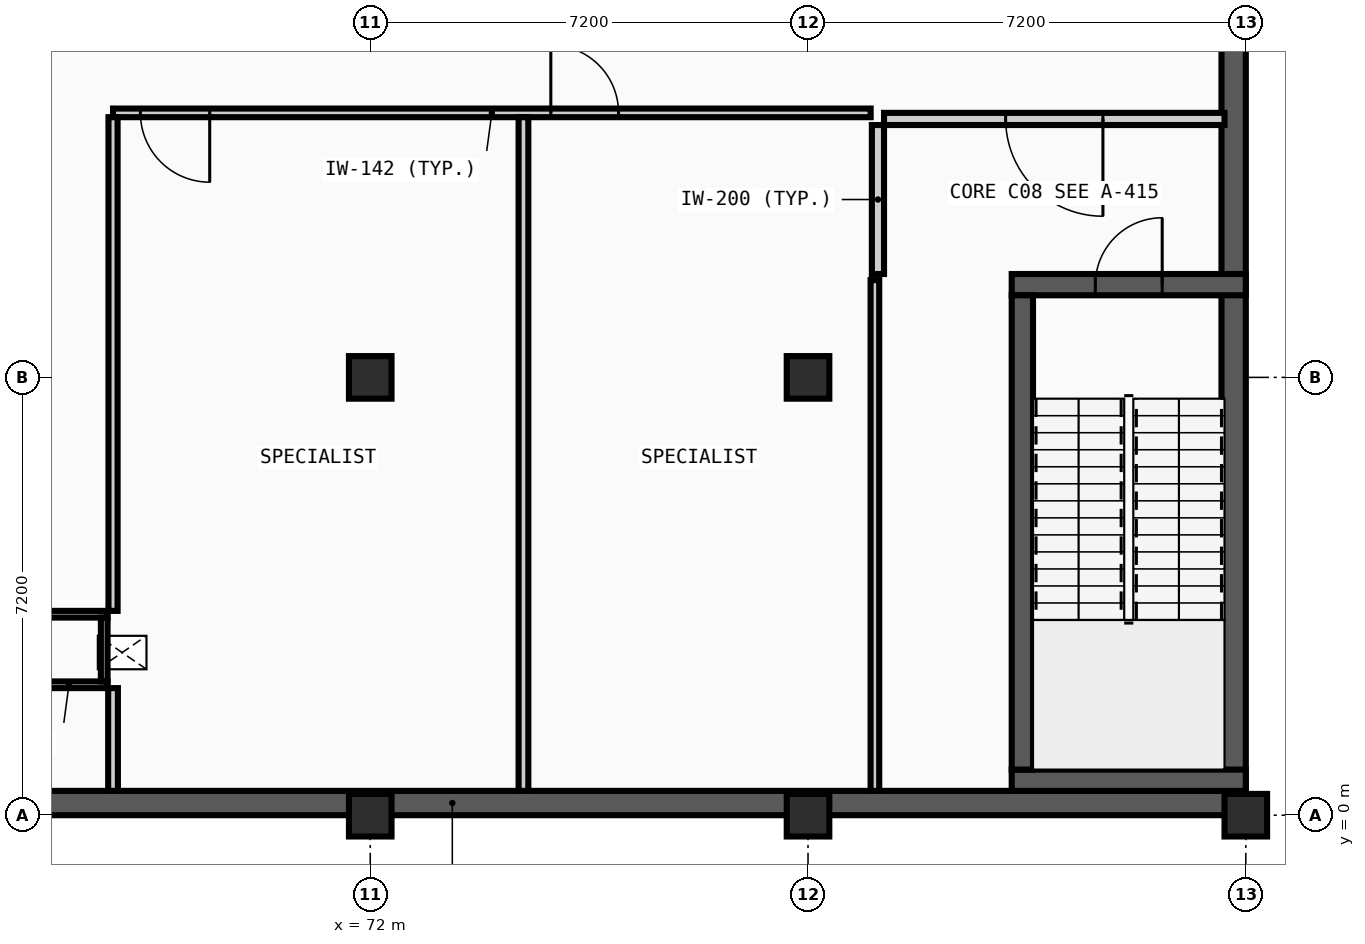
"""IFC4 building model, lengths in metres.
Left out: names, types, materials, properties, quantities, classifications, styles, units other than length and angle.
Written with IfcOpenShell. Run it as: python <this file> out.ifc"""

import sys

from ifc_helpers import new_model, si_unit, direction, frame, frame_2d, origin, origin_2d, place, context, subcontext, project, spatial, rectangle, extrude, element, fill, save


model = new_model("IFC4")
c1 = context("Model", 3, precision=1e-05, world=origin(), true_north=direction((0.0, 1.0)))
c2 = subcontext(c1, "Body", "Model", "MODEL_VIEW")
j1 = project(units=[si_unit("LENGTHUNIT", "METRE"), si_unit("PLANEANGLEUNIT", "RADIAN")], contexts=[c1])
p1 = place(None, origin())
s1 = spatial("IfcSite", under=j1, at=p1, CompositionType="ELEMENT")
p2 = place(p1, origin())
s2 = spatial("IfcBuilding", under=s1, at=p2, CompositionType="ELEMENT")
p3 = place(p2, frame((0.0, 0.0, -4.8)))
s3 = spatial("IfcBuildingStorey", under=s2, at=p3, CompositionType="ELEMENT", Elevation=-4.8)
for number, where, z_axis, x_axis in (
    (1, (72.0, 0.0, 0.0), (0.0, 0.0, 1.0), (1.0, 0.0, 0.0)),
    (2, (72.0, 7.2, 0.0), (0.0, 0.0, 1.0), (1.0, 0.0, 0.0)),
    (3, (79.2, 0.0, 0.0), (0.0, 0.0, 1.0), (1.0, 0.0, 0.0)),
    (4, (79.2, 7.2, 0.0), (0.0, 0.0, 1.0), (1.0, 0.0, 0.0)),
    (5, (86.4, 0.0, 0.0), (0.0, 0.0, 1.0), (1.0, 0.0, 0.0)),
):
    element("IfcColumn", number, at=place(p3, frame(where, z_axis=z_axis, x_axis=x_axis)), inside=s3, PredefinedType="COLUMN", context=c2, shape_type="SweptSolid", body=[
        extrude(rectangle(XDim=0.7, YDim=0.7, at=origin_2d()), origin(), (0.0, 0.0, 1.0), 4.8),
    ])
p4 = place(p3, frame((0.0, 0.2, 0.0), z_axis=(0.0, 0.0, 1.0), x_axis=(1.0, 0.0, 0.0)))
e6 = element("IfcWall", 6, at=p4, inside=s3, PredefinedType="USERDEFINED", context=c2, shape_type="SweptSolid", body=[
    extrude(rectangle(XDim=86.4, YDim=0.4, at=frame_2d((43.2, 0.0))), origin(), (0.0, 0.0, 1.0), 4.545),
])
p5 = place(p3, frame((86.2, 0.4, 0.0), z_axis=(0.0, 0.0, 1.0), x_axis=(0.0, 1.0, 0.0)))
e7 = element("IfcWall", 7, at=p5, inside=s3, PredefinedType="USERDEFINED", context=c2, shape_type="SweptSolid", body=[
    extrude(rectangle(XDim=28.4, YDim=0.4, at=frame_2d((14.2, 0.0))), origin(), (0.0, 0.0, 1.0), 4.545),
])
p6 = place(p3, frame((82.55, 0.575, 0.0), z_axis=(0.0, 0.0, 1.0), x_axis=(1.0, 0.0, 0.0)))
e8 = element("IfcWall", 8, at=p6, inside=s3, PredefinedType="SHEAR", context=c2, shape_type="SweptSolid", body=[
    extrude(rectangle(XDim=3.85, YDim=0.35, at=frame_2d((1.925, 0.0))), origin(), (0.0, 0.0, 1.0), 4.545),
])
p7 = place(p3, frame((82.55, 8.725, 0.0), z_axis=(0.0, 0.0, 1.0), x_axis=(1.0, 0.0, 0.0)))
e9 = element("IfcWall", 9, at=p7, inside=s3, PredefinedType="SHEAR", context=c2, shape_type="SweptSolid", body=[
    extrude(rectangle(XDim=3.85, YDim=0.35, at=frame_2d((1.925, 0.0))), origin(), (0.0, 0.0, 1.0), 4.545),
])
p8 = place(p7, frame((1.375, 0.0, 0.0)))
e10 = element("IfcOpeningElement", 10, at=p8, cuts=e9, PredefinedType="OPENING", context=c2, shape_type="SweptSolid", body=[
    extrude(rectangle(XDim=1.1, YDim=2.15, at=frame_2d((0.55, 1.075))), frame((0.0, 0.185, 0.0), z_axis=(0.0, -1.0, 0.0), x_axis=(1.0, 0.0, 0.0)), (0.0, 0.0, 1.0), 0.37),
])
p9 = place(p3, frame((82.725, 0.75, 0.0), z_axis=(0.0, 0.0, 1.0), x_axis=(0.0, 1.0, 0.0)))
e11 = element("IfcWall", 11, at=p9, inside=s3, PredefinedType="SHEAR", context=c2, shape_type="SweptSolid", body=[
    extrude(rectangle(XDim=7.8, YDim=0.35, at=frame_2d((3.9, 0.0))), origin(), (0.0, 0.0, 1.0), 4.545),
])
p10 = place(p3, frame((80.45, 11.45, 0.0), z_axis=(0.0, 0.0, 1.0), x_axis=(1.0, 0.0, 0.0)))
e12 = element("IfcWall", 12, at=p10, inside=s3, PredefinedType="PARTITIONING", context=c2, shape_type="SweptSolid", body=[
    extrude(rectangle(XDim=5.6, YDim=0.2, at=frame_2d((2.8, 0.0))), origin(), (0.0, 0.0, 1.0), 4.545),
])
p11 = place(p10, frame((2.0, 0.0, 0.0)))
e13 = element("IfcOpeningElement", 13, at=p11, cuts=e12, PredefinedType="OPENING", context=c2, shape_type="SweptSolid", body=[
    extrude(rectangle(XDim=1.6, YDim=2.2, at=frame_2d((0.8, 1.1))), frame((0.0, 0.11, 0.0), z_axis=(0.0, -1.0, 0.0), x_axis=(1.0, 0.0, 0.0)), (0.0, 0.0, 1.0), 0.22),
])
p12 = place(p3, frame((80.35, 8.9, 0.0), z_axis=(0.0, 0.0, 1.0), x_axis=(0.0, 1.0, 0.0)))
e14 = element("IfcWall", 14, at=p12, inside=s3, PredefinedType="PARTITIONING", context=c2, shape_type="SweptSolid", body=[
    extrude(rectangle(XDim=2.45, YDim=0.2, at=frame_2d((1.225, 0.0))), origin(), (0.0, 0.0, 1.0), 4.545),
])
for number, where, z_axis, x_axis in (
    (15, (66.41, 2.145, 0.0), (0.0, 0.0, 1.0), (1.0, 0.0, 0.0)),
    (16, (66.41, 3.305, 0.0), (0.0, 0.0, 1.0), (1.0, 0.0, 0.0)),
):
    element("IfcWall", number, at=place(p3, frame(where, z_axis=z_axis, x_axis=x_axis)), inside=s3, PredefinedType="PARTITIONING", context=c2, shape_type="SweptSolid", body=[
        extrude(rectangle(XDim=1.27, YDim=0.11, at=frame_2d((0.635, 0.0))), origin(), (0.0, 0.0, 1.0), 4.54),
    ])
p13 = place(p3, frame((67.625, 2.2, 0.0), z_axis=(0.0, 0.0, 1.0), x_axis=(0.0, 1.0, 0.0)))
e17 = element("IfcWall", 17, at=p13, inside=s3, PredefinedType="PARTITIONING", context=c2, shape_type="SweptSolid", body=[
    extrude(rectangle(XDim=1.05, YDim=0.11, at=frame_2d((0.525, 0.0))), origin(), (0.0, 0.0, 1.0), 4.54),
])
p14 = place(p3, frame((67.77, 11.55, 0.0), z_axis=(0.0, 0.0, 1.0), x_axis=(1.0, 0.0, 0.0)))
e18 = element("IfcWall", 18, at=p14, inside=s3, PredefinedType="PARTITIONING", context=c2, shape_type="SweptSolid", body=[
    extrude(rectangle(XDim=12.46, YDim=0.142, at=frame_2d((6.23, 0.0))), origin(), (0.0, 0.0, 1.0), 4.545),
])
p15 = place(p14, frame((7.2, 0.0, 0.0)))
e19 = element("IfcOpeningElement", 19, at=p15, cuts=e18, PredefinedType="OPENING", context=c2, shape_type="SweptSolid", body=[
    extrude(rectangle(XDim=1.114, YDim=2.04, at=frame_2d((0.557, 1.02))), frame((0.0, 0.081, 0.0), z_axis=(0.0, -1.0, 0.0), x_axis=(1.0, 0.0, 0.0)), (0.0, 0.0, 1.0), 0.162),
])
p16 = place(p14, frame((0.45, 0.0, 0.0)))
e20 = element("IfcOpeningElement", 20, at=p16, cuts=e18, PredefinedType="OPENING", context=c2, shape_type="SweptSolid", body=[
    extrude(rectangle(XDim=1.14, YDim=2.04, at=frame_2d((0.57, 1.02))), frame((0.0, 0.081, 0.0), z_axis=(0.0, -1.0, 0.0), x_axis=(1.0, 0.0, 0.0)), (0.0, 0.0, 1.0), 0.162),
])
p17 = place(p3, frame((67.77, 0.4, 0.0), z_axis=(0.0, 0.0, 1.0), x_axis=(0.0, 1.0, 0.0)))
e21 = element("IfcWall", 21, at=p17, inside=s3, PredefinedType="PARTITIONING", context=c2, shape_type="SweptSolid", body=[
    extrude(rectangle(XDim=1.69, YDim=0.16, at=frame_2d((0.845, 0.0))), origin(), (0.0, 0.0, 1.0), 4.545),
])
p18 = place(p3, frame((67.77, 3.36, 0.0), z_axis=(0.0, 0.0, 1.0), x_axis=(0.0, 1.0, 0.0)))
e22 = element("IfcWall", 22, at=p18, inside=s3, PredefinedType="PARTITIONING", context=c2, shape_type="SweptSolid", body=[
    extrude(rectangle(XDim=8.119, YDim=0.15, at=frame_2d((4.06, 0.0))), origin(), (0.0, 0.0, 1.0), 4.545),
])
p19 = place(p3, frame((74.52, 0.4, 0.0), z_axis=(0.0, 0.0, 1.0), x_axis=(0.0, 1.0, 0.0)))
e23 = element("IfcWall", 23, at=p19, inside=s3, PredefinedType="PARTITIONING", context=c2, shape_type="SweptSolid", body=[
    extrude(rectangle(XDim=11.079, YDim=0.16, at=frame_2d((5.54, 0.0))), origin(), (0.0, 0.0, 1.0), 4.235),
])
p20 = place(p3, frame((80.3, 0.4, 0.0), z_axis=(0.0, 0.0, 1.0), x_axis=(0.0, 1.0, 0.0)))
e24 = element("IfcWall", 24, at=p20, inside=s3, PredefinedType="PARTITIONING", context=c2, shape_type="SweptSolid", body=[
    extrude(rectangle(XDim=8.4, YDim=0.142, at=frame_2d((4.2, 0.0))), origin(), (0.0, 0.0, 1.0), 4.545),
])
p21 = place(p8, frame((1.1, 0.0, 0.0), z_axis=(0.0, 0.0, 1.0), x_axis=(-1.0, 0.0, 0.0)))
e25 = element("IfcDoor", 25, at=p21, inside=s3, OperationType="SINGLE_SWING_RIGHT", PredefinedType="DOOR", context=c2, shape_type="SweptSolid", body=[
    extrude(rectangle(XDim=1.1, YDim=2.15, at=frame_2d((0.55, 1.075))), frame((0.0, 0.025, 0.0), z_axis=(0.0, -1.0, 0.0), x_axis=(1.0, 0.0, 0.0)), (0.0, 0.0, 1.0), 0.05),
])
fill(e10, e25)
p22 = place(p11, origin())
e26 = element("IfcDoor", 26, at=p22, inside=s3, OperationType="DOUBLE_DOOR_SINGLE_SWING", PredefinedType="DOOR", context=c2, shape_type="SweptSolid", body=[
    extrude(rectangle(XDim=1.6, YDim=2.2, at=frame_2d((0.8, 1.1))), frame((0.0, 0.025, 0.0), z_axis=(0.0, -1.0, 0.0), x_axis=(1.0, 0.0, 0.0)), (0.0, 0.0, 1.0), 0.05),
])
fill(e13, e26)
p23 = place(p15, origin())
e27 = element("IfcDoor", 27, at=p23, inside=s3, OperationType="SINGLE_SWING_LEFT", PredefinedType="DOOR", context=c2, shape_type="SweptSolid", body=[
    extrude(rectangle(XDim=1.114, YDim=2.04, at=frame_2d((0.557, 1.02))), frame((0.0, 0.025, 0.0), z_axis=(0.0, -1.0, 0.0), x_axis=(1.0, 0.0, 0.0)), (0.0, 0.0, 1.0), 0.05),
])
fill(e19, e27)
p24 = place(p16, origin())
e28 = element("IfcDoor", 28, at=p24, inside=s3, OperationType="SINGLE_SWING_RIGHT", PredefinedType="DOOR", context=c2, shape_type="SweptSolid", body=[
    extrude(rectangle(XDim=1.14, YDim=2.04, at=frame_2d((0.57, 1.02))), frame((0.0, 0.025, 0.0), z_axis=(0.0, -1.0, 0.0), x_axis=(1.0, 0.0, 0.0)), (0.0, 0.0, 1.0), 0.05),
])
fill(e20, e28)
save(model, sys.argv[1])
